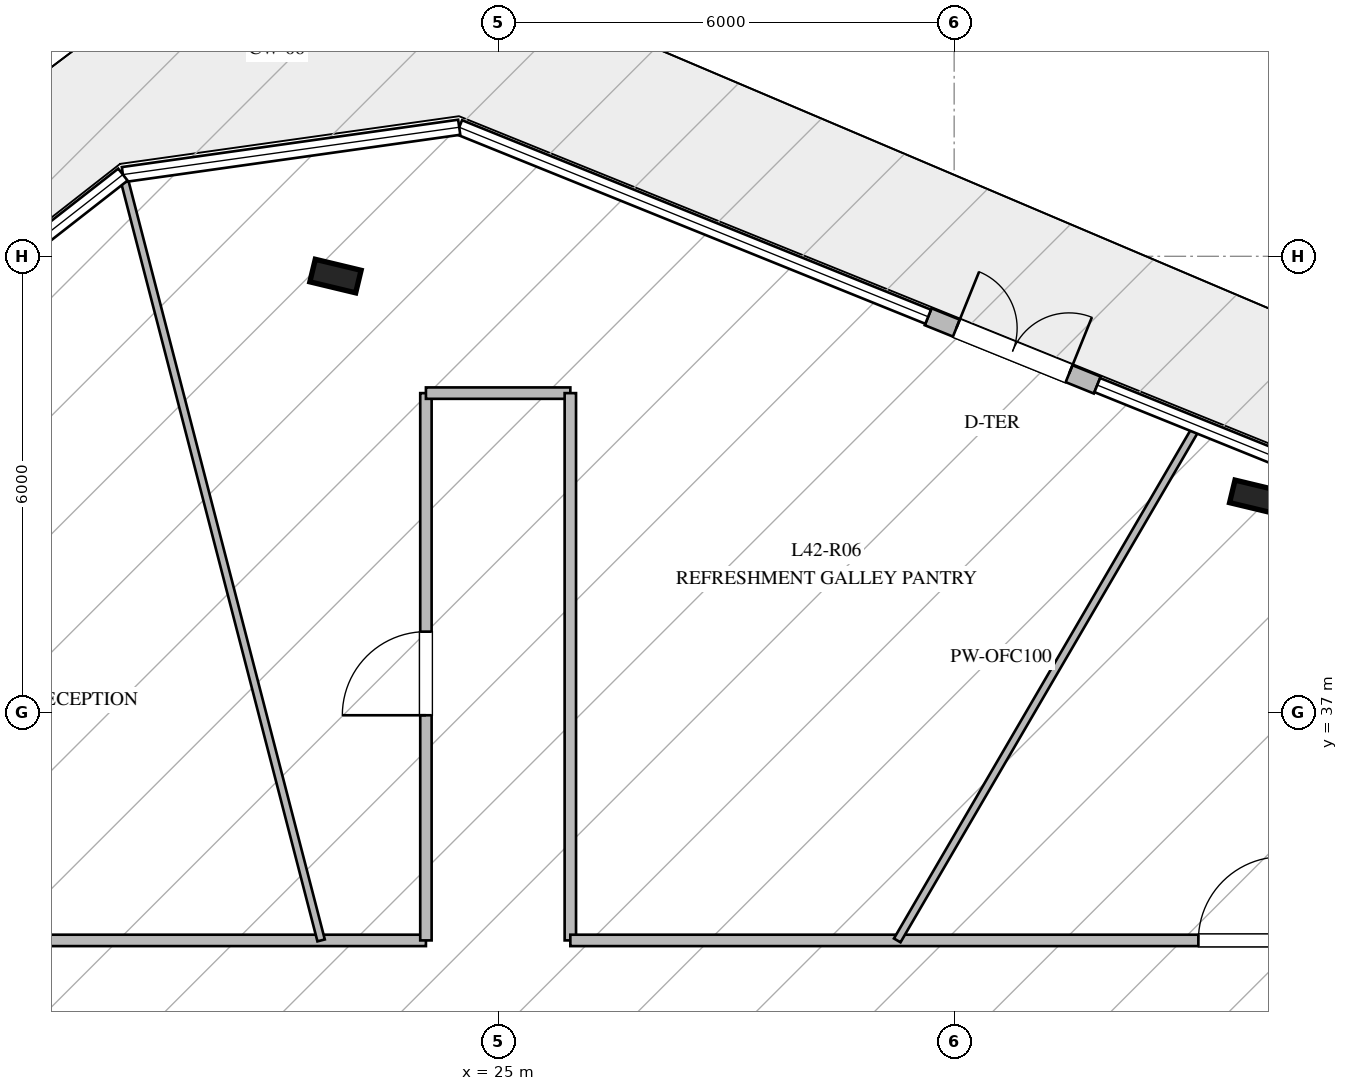
"""IFC4 building model, lengths in metres.
Left out: names, types, materials, properties, quantities, classifications, styles, units other than length and angle.
Written with IfcOpenShell. Run it as: python <this file> out.ifc"""

import sys

from ifc_helpers import new_model, si_unit, direction, frame, frame_2d, origin, origin_2d, place, context, subcontext, project, spatial, rectangle, i_section, extrude, element, fill, save


model = new_model("IFC4")
c1 = context("Model", 3, precision=1e-05, world=origin(), true_north=direction((0.0, 1.0)))
c2 = subcontext(c1, "Body", "Model", "MODEL_VIEW")
j1 = project(units=[si_unit("LENGTHUNIT", "METRE"), si_unit("PLANEANGLEUNIT", "RADIAN")], contexts=[c1])
p1 = place(None, origin())
s1 = spatial("IfcSite", under=j1, at=p1, CompositionType="ELEMENT")
p2 = place(p1, origin())
s2 = spatial("IfcBuilding", under=s1, at=p2, CompositionType="ELEMENT")
p3 = place(p2, frame((0.0, 0.0, 175.8)))
s3 = spatial("IfcBuildingStorey", under=s2, at=p3, CompositionType="ELEMENT", Elevation=175.8)
for number, where, z_axis, x_axis in (
    (1, (34.961, 39.835, -0.27), (0.0, 0.0, 1.0), (-0.972, 0.233, 0.0)),
    (2, (22.86, 42.74, -0.27), (0.0, 0.0, 1.0), (-0.972, 0.233, 0.0)),
):
    element("IfcColumn", number, at=place(p3, frame(where, z_axis=z_axis, x_axis=x_axis)), inside=s3, PredefinedType="COLUMN", context=c2, shape_type="SweptSolid", body=[
        extrude(i_section(OverallWidth=0.305, OverallDepth=0.62, WebThickness=0.021, FlangeThickness=0.04, at=origin_2d()), origin(), (0.0, 0.0, 1.0), 5.27),
    ])
p4 = place(p3, frame((32.883, 41.306, 0.0), z_axis=(0.0, 0.0, 1.0), x_axis=(-0.927158943198, 0.374668245315, 0.0)))
e3 = element("IfcWall", 3, at=p4, inside=s3, PredefinedType="STANDARD", context=c2, shape_type="SweptSolid", body=[
    extrude(rectangle(XDim=2.4, YDim=0.24, at=frame_2d((1.2, 0.0))), origin(), (0.0, 0.0, 1.0), 4.78),
])
p5 = place(p4, frame((0.4, 0.0, 0.0)))
e4 = element("IfcOpeningElement", 4, at=p5, cuts=e3, PredefinedType="OPENING", context=c2, shape_type="SweptSolid", body=[
    extrude(rectangle(XDim=1.6, YDim=2.25, at=frame_2d((0.8, 1.125))), frame((0.0, 0.13, 0.0), z_axis=(0.0, -1.0, 0.0), x_axis=(1.0, 0.0, 0.0)), (0.0, 0.0, 1.0), 0.26),
])
p6 = place(p3, frame((17.2, 34.0, 0.0), z_axis=(0.0, 0.0, 1.0), x_axis=(1.0, 0.0, 0.0)))
e5 = element("IfcWall", 5, at=p6, inside=s3, PredefinedType="PARTITIONING", context=c2, shape_type="SweptSolid", body=[
    extrude(rectangle(XDim=6.85, YDim=0.15, at=frame_2d((3.425, 0.0))), origin(), (0.0, 0.0, 1.0), 4.28),
])
p7 = place(p3, frame((24.05, 34.0, 0.0), z_axis=(0.0, 0.0, 1.0), x_axis=(0.0, 1.0, 0.0)))
e6 = element("IfcWall", 6, at=p7, inside=s3, PredefinedType="PARTITIONING", context=c2, shape_type="SweptSolid", body=[
    extrude(rectangle(XDim=7.2, YDim=0.15, at=frame_2d((3.6, 0.0))), origin(), (0.0, 0.0, 1.0), 4.05),
])
p8 = place(p7, frame((2.962, 0.0, 0.0)))
e7 = element("IfcOpeningElement", 7, at=p8, cuts=e6, PredefinedType="OPENING", context=c2, shape_type="SweptSolid", body=[
    extrude(rectangle(XDim=1.1, YDim=2.2, at=frame_2d((0.55, 1.1))), frame((0.0, 0.085, 0.0), z_axis=(0.0, -1.0, 0.0), x_axis=(1.0, 0.0, 0.0)), (0.0, 0.0, 1.0), 0.17),
])
p9 = place(p3, frame((24.05, 41.2, 0.0), z_axis=(0.0, 0.0, 1.0), x_axis=(1.0, 0.0, 0.0)))
e8 = element("IfcWall", 8, at=p9, inside=s3, PredefinedType="PARTITIONING", context=c2, shape_type="SweptSolid", body=[
    extrude(rectangle(XDim=1.9, YDim=0.15, at=frame_2d((0.95, 0.0))), origin(), (0.0, 0.0, 1.0), 4.78),
])
p10 = place(p3, frame((25.95, 41.2, 0.0), z_axis=(0.0, 0.0, 1.0), x_axis=(0.0, -1.0, 0.0)))
e9 = element("IfcWall", 9, at=p10, inside=s3, PredefinedType="PARTITIONING", context=c2, shape_type="SweptSolid", body=[
    extrude(rectangle(XDim=7.2, YDim=0.15, at=frame_2d((3.6, 0.0))), origin(), (0.0, 0.0, 1.0), 4.05),
])
p11 = place(p3, frame((25.95, 34.0, 0.0), z_axis=(0.0, 0.0, 1.0), x_axis=(1.0, 0.0, 0.0)))
e10 = element("IfcWall", 10, at=p11, inside=s3, PredefinedType="PARTITIONING", context=c2, shape_type="SweptSolid", body=[
    extrude(rectangle(XDim=13.644, YDim=0.15, at=frame_2d((6.822, 0.0))), origin(), (0.0, 0.0, 1.0), 4.18),
])
p12 = place(p11, frame((8.263, 0.0, 0.0)))
e11 = element("IfcOpeningElement", 11, at=p12, cuts=e10, PredefinedType="OPENING", context=c2, shape_type="SweptSolid", body=[
    extrude(rectangle(XDim=1.1, YDim=2.2, at=frame_2d((0.55, 1.1))), frame((0.0, 0.085, 0.0), z_axis=(0.0, -1.0, 0.0), x_axis=(1.0, 0.0, 0.0)), (0.0, 0.0, 1.0), 0.17),
])
p13 = place(p3, frame((30.251, 34.0, 0.0), z_axis=(0.0, 0.0, 1.0), x_axis=(0.503904002924, 0.863759663238, 0.0)))
e12 = element("IfcWall", 12, at=p13, inside=s3, PredefinedType="MOVABLE", context=c2, shape_type="SweptSolid", body=[
    extrude(rectangle(XDim=7.825, YDim=0.1, at=frame_2d((3.913, 0.0))), origin(), (0.0, 0.0, 1.0), 4.05),
])
p14 = place(p3, frame((22.671, 34.0, 0.0), z_axis=(0.0, 0.0, 1.0), x_axis=(-0.250522569183, 0.96811075933, 0.0)))
e13 = element("IfcWall", 13, at=p14, inside=s3, PredefinedType="MOVABLE", context=c2, shape_type="SweptSolid", body=[
    extrude(rectangle(XDim=10.389, YDim=0.1, at=frame_2d((5.195, 0.0))), origin(), (0.0, 0.0, 1.0), 4.05),
])
p15 = place(p5, frame((1.6, 0.0, 0.0), z_axis=(0.0, 0.0, 1.0), x_axis=(-1.0, 0.0, 0.0)))
e14 = element("IfcDoor", 14, at=p15, inside=s3, OperationType="DOUBLE_DOOR_SINGLE_SWING", PredefinedType="DOOR", context=c2, shape_type="SweptSolid", body=[
    extrude(rectangle(XDim=1.6, YDim=2.25, at=frame_2d((0.8, 1.125))), frame((0.0, 0.025, 0.0), z_axis=(0.0, -1.0, 0.0), x_axis=(1.0, 0.0, 0.0)), (0.0, 0.0, 1.0), 0.05),
])
fill(e4, e14)
p16 = place(p12, origin())
e15 = element("IfcDoor", 15, at=p16, inside=s3, OperationType="SINGLE_SWING_RIGHT", PredefinedType="DOOR", context=c2, shape_type="SweptSolid", body=[
    extrude(rectangle(XDim=1.1, YDim=2.2, at=frame_2d((0.55, 1.1))), frame((0.0, 0.025, 0.0), z_axis=(0.0, -1.0, 0.0), x_axis=(1.0, 0.0, 0.0)), (0.0, 0.0, 1.0), 0.05),
])
fill(e11, e15)
p17 = place(p8, origin())
e16 = element("IfcDoor", 16, at=p17, inside=s3, OperationType="SINGLE_SWING_LEFT", PredefinedType="DOOR", context=c2, shape_type="SweptSolid", body=[
    extrude(rectangle(XDim=1.1, YDim=2.2, at=frame_2d((0.55, 1.1))), frame((0.0, 0.025, 0.0), z_axis=(0.0, -1.0, 0.0), x_axis=(1.0, 0.0, 0.0)), (0.0, 0.0, 1.0), 0.05),
])
fill(e7, e16)
save(model, sys.argv[1])
